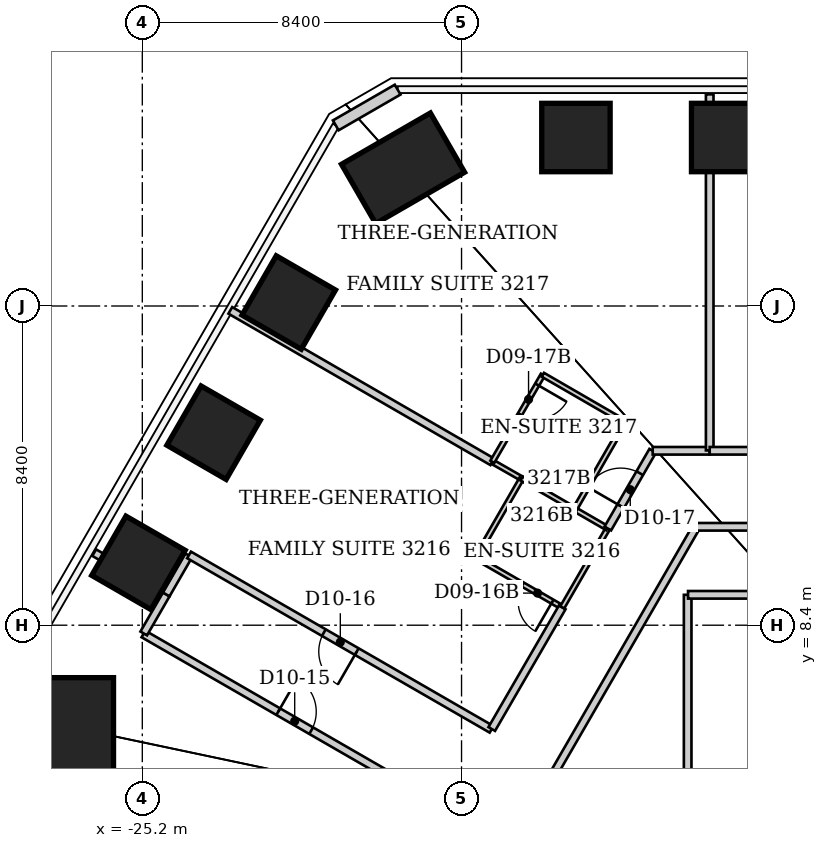
"""IFC4 building model, lengths in metres.
Left out: names, types, materials, properties, quantities, classifications, styles, units other than length and angle.
Written with IfcOpenShell. Run it as: python <this file> out.ifc"""

import sys

from ifc_helpers import new_model, si_unit, direction, frame, frame_2d, origin, origin_2d, place, context, subcontext, project, spatial, rectangle, extrude, element, fill, save


model = new_model("IFC4")
c1 = context("Model", 3, precision=1e-05, world=origin(), true_north=direction((0.0, 1.0)))
c2 = subcontext(c1, "Body", "Model", "MODEL_VIEW")
j1 = project(units=[si_unit("LENGTHUNIT", "METRE"), si_unit("PLANEANGLEUNIT", "RADIAN")], contexts=[c1])
p1 = place(None, origin())
s1 = spatial("IfcSite", under=j1, at=p1, CompositionType="ELEMENT")
p2 = place(p1, origin())
s2 = spatial("IfcBuilding", under=s1, at=p2, CompositionType="ELEMENT")
p3 = place(p2, frame((0.0, 0.0, 131.0)))
s3 = spatial("IfcBuildingStorey", under=s2, at=p3, CompositionType="ELEMENT", Elevation=131.0)
for number, where, z_axis, x_axis in (
    (1, (-13.79, 21.234, 0.0), (0.0, 0.0, 1.0), (0.0, 1.0, 0.0)),
    (2, (-9.85, 21.234, 0.0), (0.0, 0.0, 1.0), (0.0, 1.0, 0.0)),
):
    element("IfcColumn", number, at=place(p3, frame(where, z_axis=z_axis, x_axis=x_axis)), inside=s3, PredefinedType="COLUMN", context=c2, shape_type="SweptSolid", body=[
        extrude(rectangle(XDim=1.8, YDim=1.8, at=origin_2d()), origin(), (0.0, 0.0, 1.0), 3.8),
    ])
p4 = place(p3, frame((-26.857, 5.67, 0.0), z_axis=(0.0, 0.0, 1.0), x_axis=(-1.0, 0.0, 0.0)))
e3 = element("IfcColumn", 3, at=p4, inside=s3, PredefinedType="COLUMN", context=c2, shape_type="SweptSolid", body=[
    extrude(rectangle(XDim=1.8, YDim=2.7, at=origin_2d()), origin(), (0.0, 0.0, 1.0), 3.8),
])
for number, where, z_axis, x_axis in (
    (4, (-25.302, 10.041, 0.0), (0.0, 0.0, 1.0), (-0.866, 0.5, 0.0)),
    (5, (-23.324, 13.466, 0.0), (0.0, 0.0, 1.0), (-0.866, 0.5, 0.0)),
    (6, (-21.346, 16.891, 0.0), (0.0, 0.0, 1.0), (-0.866, 0.5, 0.0)),
):
    element("IfcColumn", number, at=place(p3, frame(where, z_axis=z_axis, x_axis=x_axis)), inside=s3, PredefinedType="COLUMN", context=c2, shape_type="SweptSolid", body=[
        extrude(rectangle(XDim=1.8, YDim=1.8, at=origin_2d()), origin(), (0.0, 0.0, 1.0), 3.8),
    ])
p5 = place(p3, frame((-18.339, 20.424, 0.0), z_axis=(0.0, 0.0, 1.0), x_axis=(-0.5, 0.866025403784, 0.0)))
e7 = element("IfcColumn", 7, at=p5, inside=s3, PredefinedType="COLUMN", context=c2, shape_type="SweptSolid", body=[
    extrude(rectangle(XDim=1.8, YDim=2.7, at=origin_2d()), origin(), (0.0, 0.0, 1.0), 3.8),
])
p6 = place(p3, frame((-20.11, 21.554, 0.0), z_axis=(0.0, 0.0, 1.0), x_axis=(0.865988793993, 0.500063404658, 0.0)))
e8 = element("IfcWall", 8, at=p6, inside=s3, PredefinedType="SOLIDWALL", context=c2, shape_type="SweptSolid", body=[
    extrude(rectangle(XDim=1.88, YDim=0.3, at=frame_2d((0.94, 0.0))), origin(), (0.0, 0.0, 1.0), 3.64),
])
p7 = place(p3, frame((-26.466, 10.31, 0.0), z_axis=(0.0, 0.0, 1.0), x_axis=(0.865037029405, -0.501708020425, 0.0)))
e9 = element("IfcWall", 9, at=p7, inside=s3, PredefinedType="PARTITIONING", context=c2, shape_type="SweptSolid", body=[
    extrude(rectangle(XDim=2.177, YDim=0.2, at=frame_2d((1.089, 0.0))), origin(), (0.0, 0.0, 1.0), 3.64),
])
p8 = place(p3, frame((-25.17, 8.17, 0.0), z_axis=(0.0, 0.0, 1.0), x_axis=(0.866300573619, -0.499523088702, 0.0)))
e10 = element("IfcWall", 10, at=p8, inside=s3, PredefinedType="PARTITIONING", context=c2, shape_type="SweptSolid", body=[
    extrude(rectangle(XDim=9.188, YDim=0.2, at=frame_2d((4.594, 0.0))), origin(), (0.0, 0.0, 1.0), 3.64),
])
p9 = place(p8, frame((4.094, 0.0, 0.0)))
e11 = element("IfcOpeningElement", 11, at=p9, cuts=e10, PredefinedType="OPENING", context=c2, shape_type="SweptSolid", body=[
    extrude(rectangle(XDim=1.0, YDim=2.13, at=frame_2d((0.5, 1.065))), frame((0.0, 0.1, 0.0), z_axis=(0.0, -1.0, 0.0), x_axis=(1.0, 0.0, 0.0)), (0.0, 0.0, 1.0), 0.2),
])
for number, where, z_axis, x_axis in (
    (12, (-24.57, 9.21, 0.0), (0.0, 0.0, 1.0), (-0.5, -0.866, 0.0)),
    (13, (-23.978, 10.237, 0.0), (0.0, 0.0, 1.0), (-0.5, -0.866, 0.0)),
):
    element("IfcWall", number, at=place(p3, frame(where, z_axis=z_axis, x_axis=x_axis)), inside=s3, PredefinedType="PARTITIONING", context=c2, shape_type="SweptSolid", body=[
        extrude(rectangle(XDim=1.186, YDim=0.2, at=frame_2d((0.593, 0.0))), origin(), (0.0, 0.0, 1.0), 3.64),
    ])
p10 = place(p3, frame((-22.884, 16.685, 0.0), z_axis=(0.0, 0.0, 1.0), x_axis=(0.865762644918, -0.500454835789, 0.0)))
e14 = element("IfcWall", 14, at=p10, inside=s3, PredefinedType="PARTITIONING", context=c2, shape_type="SweptSolid", body=[
    extrude(rectangle(XDim=7.963, YDim=0.2, at=frame_2d((3.981, 0.0))), origin(), (0.0, 0.0, 1.0), 3.64),
])
p11 = place(p3, frame((-16.42, 10.18, 0.0), z_axis=(0.0, 0.0, 1.0), x_axis=(0.866114241029, -0.499846097802, 0.0)))
e15 = element("IfcWall", 15, at=p11, inside=s3, PredefinedType="PARTITIONING", context=c2, shape_type="SweptSolid", body=[
    extrude(rectangle(XDim=2.621, YDim=0.12, at=frame_2d((1.311, 0.0))), origin(), (0.0, 0.0, 1.0), 3.64),
])
p12 = place(p11, frame((1.421, 0.0, 0.0)))
e16 = element("IfcOpeningElement", 16, at=p12, cuts=e15, PredefinedType="OPENING", context=c2, shape_type="SweptSolid", body=[
    extrude(rectangle(XDim=0.9, YDim=2.03, at=frame_2d((0.45, 1.015))), frame((0.0, 0.06, 0.0), z_axis=(0.0, -1.0, 0.0), x_axis=(1.0, 0.0, 0.0)), (0.0, 0.0, 1.0), 0.12),
])
p13 = place(p3, frame((-16.01, 5.66, 0.0), z_axis=(0.0, 0.0, 1.0), x_axis=(-0.866289075554, 0.499543028754, 0.0)))
e17 = element("IfcWall", 17, at=p13, inside=s3, PredefinedType="PARTITIONING", context=c2, shape_type="SweptSolid", body=[
    extrude(rectangle(XDim=9.188, YDim=0.2, at=frame_2d((4.594, 0.0))), origin(), (0.0, 0.0, 1.0), 3.64),
])
p14 = place(p13, frame((4.094, 0.0, 0.0)))
e18 = element("IfcOpeningElement", 18, at=p14, cuts=e17, PredefinedType="OPENING", context=c2, shape_type="SweptSolid", body=[
    extrude(rectangle(XDim=1.0, YDim=2.13, at=frame_2d((0.5, 1.065))), frame((0.0, 0.1, 0.0), z_axis=(0.0, -1.0, 0.0), x_axis=(1.0, 0.0, 0.0)), (0.0, 0.0, 1.0), 0.2),
])
p15 = place(p3, frame((-16.005, 5.669, 0.0), z_axis=(0.0, 0.0, 1.0), x_axis=(0.501374384923, 0.865230446842, 0.0)))
e19 = element("IfcWall", 19, at=p15, inside=s3, PredefinedType="PARTITIONING", context=c2, shape_type="SweptSolid", body=[
    extrude(rectangle(XDim=3.7, YDim=0.2, at=frame_2d((1.85, 0.0))), origin(), (0.0, 0.0, 1.0), 3.64),
])
p16 = place(p3, frame((-15.99, 12.7, 0.0), z_axis=(0.0, 0.0, 1.0), x_axis=(0.868277022428, -0.496079643125, 0.0)))
e20 = element("IfcWall", 20, at=p16, inside=s3, PredefinedType="PARTITIONING", context=c2, shape_type="SweptSolid", body=[
    extrude(rectangle(XDim=0.887, YDim=0.12, at=frame_2d((0.443, 0.0))), origin(), (0.0, 0.0, 1.0), 3.64),
])
p17 = place(p3, frame((-15.41, 2.7, 0.0), z_axis=(0.0, 0.0, 1.0), x_axis=(0.500296290322, 0.865854272894, 0.0)))
e21 = element("IfcWall", 21, at=p17, inside=s3, PredefinedType="PARTITIONING", context=c2, shape_type="SweptSolid", body=[
    extrude(rectangle(XDim=9.574, YDim=0.2, at=frame_2d((4.787, 0.0))), origin(), (0.0, 0.0, 1.0), 3.64),
])
p18 = place(p3, frame((-15.22, 12.26, 0.0), z_axis=(0.0, 0.0, 1.0), x_axis=(-0.499693115345, -0.866202511239, 0.0)))
e22 = element("IfcWall", 22, at=p18, inside=s3, PredefinedType="PARTITIONING", context=c2, shape_type="SweptSolid", body=[
    extrude(rectangle(XDim=2.401, YDim=0.12, at=frame_2d((1.201, 0.0))), origin(), (0.0, 0.0, 1.0), 3.64),
])
p19 = place(p3, frame((-15.22, 12.26, 0.0), z_axis=(0.0, 0.0, 1.0), x_axis=(0.864822777425, -0.502077248685, 0.0)))
e23 = element("IfcWall", 23, at=p19, inside=s3, PredefinedType="PARTITIONING", context=c2, shape_type="SweptSolid", body=[
    extrude(rectangle(XDim=1.617, YDim=0.12, at=frame_2d((0.809, 0.0))), origin(), (0.0, 0.0, 1.0), 3.64),
])
p20 = place(p3, frame((-14.66, 14.99, 0.0), z_axis=(0.0, 0.0, 1.0), x_axis=(-0.502242265546, -0.864726954997, 0.0)))
e24 = element("IfcWall", 24, at=p20, inside=s3, PredefinedType="PARTITIONING", context=c2, shape_type="SweptSolid", body=[
    extrude(rectangle(XDim=2.648, YDim=0.12, at=frame_2d((1.324, 0.0))), origin(), (0.0, 0.0, 1.0), 3.64),
])
p21 = place(p20, frame((0.3, 0.0, 0.0)))
e25 = element("IfcOpeningElement", 25, at=p21, cuts=e24, PredefinedType="OPENING", context=c2, shape_type="SweptSolid", body=[
    extrude(rectangle(XDim=0.9, YDim=2.03, at=frame_2d((0.45, 1.015))), frame((0.0, 0.06, 0.0), z_axis=(0.0, -1.0, 0.0), x_axis=(1.0, 0.0, 0.0)), (0.0, 0.0, 1.0), 0.12),
])
p22 = place(p3, frame((-14.15, 8.87, 0.0), z_axis=(0.0, 0.0, 1.0), x_axis=(0.500401517907, 0.865793463175, 0.0)))
e26 = element("IfcWall", 26, at=p22, inside=s3, PredefinedType="PARTITIONING", context=c2, shape_type="SweptSolid", body=[
    extrude(rectangle(XDim=2.396, YDim=0.12, at=frame_2d((1.198, 0.0))), origin(), (0.0, 0.0, 1.0), 3.64),
])
p23 = place(p3, frame((-13.821, 11.448, 0.0), z_axis=(0.0, 0.0, 1.0), x_axis=(0.865694957185, -0.500571914019, 0.0)))
e27 = element("IfcWall", 27, at=p23, inside=s3, PredefinedType="PARTITIONING", context=c2, shape_type="SweptSolid", body=[
    extrude(rectangle(XDim=0.995, YDim=0.12, at=frame_2d((0.498, 0.0))), origin(), (0.0, 0.0, 1.0), 3.64),
])
p24 = place(p3, frame((-13.82, 11.45, 0.0), z_axis=(0.0, 0.0, 1.0), x_axis=(0.499407914056, 0.866366975004, 0.0)))
e28 = element("IfcWall", 28, at=p24, inside=s3, PredefinedType="PARTITIONING", context=c2, shape_type="SweptSolid", body=[
    extrude(rectangle(XDim=2.643, YDim=0.12, at=frame_2d((1.322, 0.0))), origin(), (0.0, 0.0, 1.0), 3.64),
])
p25 = place(p3, frame((-12.951, 10.945, 0.0), z_axis=(0.0, 0.0, 1.0), x_axis=(0.499996855872, 0.86602721904, 0.0)))
e29 = element("IfcWall", 29, at=p25, inside=s3, PredefinedType="PARTITIONING", context=c2, shape_type="SweptSolid", body=[
    extrude(rectangle(XDim=2.362, YDim=0.2, at=frame_2d((1.181, 0.0))), origin(), (0.0, 0.0, 1.0), 3.64),
])
p26 = place(p25, frame((0.681, 0.0, 0.0)))
e30 = element("IfcOpeningElement", 30, at=p26, cuts=e29, PredefinedType="OPENING", context=c2, shape_type="SweptSolid", body=[
    extrude(rectangle(XDim=1.0, YDim=2.13, at=frame_2d((0.5, 1.065))), frame((0.0, 0.1, 0.0), z_axis=(0.0, -1.0, 0.0), x_axis=(1.0, 0.0, 0.0)), (0.0, 0.0, 1.0), 0.2),
])
p27 = place(p3, frame((-12.5, 13.74, 0.0), z_axis=(0.0, 0.0, 1.0), x_axis=(-0.865508881864, 0.500893576935, 0.0)))
e31 = element("IfcWall", 31, at=p27, inside=s3, PredefinedType="PARTITIONING", context=c2, shape_type="SweptSolid", body=[
    extrude(rectangle(XDim=2.496, YDim=0.12, at=frame_2d((1.248, 0.0))), origin(), (0.0, 0.0, 1.0), 3.64),
])
p28 = place(p3, frame((-10.85, 9.2, 0.0), z_axis=(0.0, 0.0, 1.0), x_axis=(0.0, -1.0, 0.0)))
e32 = element("IfcWall", 32, at=p28, inside=s3, PredefinedType="PARTITIONING", context=c2, shape_type="SweptSolid", body=[
    extrude(rectangle(XDim=14.39, YDim=0.2, at=frame_2d((7.195, 0.0))), origin(), (0.0, 0.0, 1.0), 3.64),
])
p29 = place(p28, frame((6.645, 0.0, 0.0)))
e33 = element("IfcOpeningElement", 33, at=p29, cuts=e32, PredefinedType="OPENING", context=c2, shape_type="SweptSolid", body=[
    extrude(rectangle(XDim=1.1, YDim=2.2, at=frame_2d((0.55, 1.1))), frame((0.0, 0.1, 0.0), z_axis=(0.0, -1.0, 0.0), x_axis=(1.0, 0.0, 0.0)), (0.0, 0.0, 1.0), 0.2),
])
p30 = place(p3, frame((-10.62, 10.99, 0.0), z_axis=(0.0, 0.0, 1.0), x_axis=(1.0, 0.0, 0.0)))
e34 = element("IfcWall", 34, at=p30, inside=s3, PredefinedType="PARTITIONING", context=c2, shape_type="SweptSolid", body=[
    extrude(rectangle(XDim=10.47, YDim=0.2, at=frame_2d((5.235, 0.0))), origin(), (0.0, 0.0, 1.0), 3.64),
])
p31 = place(p3, frame((-10.27, 12.99, 0.0), z_axis=(0.0, 0.0, 1.0), x_axis=(-1.0, 0.0, 0.0)))
e35 = element("IfcWall", 35, at=p31, inside=s3, PredefinedType="PARTITIONING", context=c2, shape_type="SweptSolid", body=[
    extrude(rectangle(XDim=1.5, YDim=0.2, at=frame_2d((0.75, 0.0))), origin(), (0.0, 0.0, 1.0), 3.64),
])
p32 = place(p3, frame((-10.27, 13.0, 0.0), z_axis=(0.0, 0.0, 1.0), x_axis=(0.0, 1.0, 0.0)))
e36 = element("IfcWall", 36, at=p32, inside=s3, PredefinedType="PARTITIONING", context=c2, shape_type="SweptSolid", body=[
    extrude(rectangle(XDim=9.37, YDim=0.2, at=frame_2d((4.685, 0.0))), origin(), (0.0, 0.0, 1.0), 3.64),
])
p33 = place(p3, frame((-0.15, 9.2, 0.0), z_axis=(0.0, 0.0, 1.0), x_axis=(-1.0, 0.0, 0.0)))
e37 = element("IfcWall", 37, at=p33, inside=s3, PredefinedType="PARTITIONING", context=c2, shape_type="SweptSolid", body=[
    extrude(rectangle(XDim=10.69, YDim=0.2, at=frame_2d((5.345, 0.0))), origin(), (0.0, 0.0, 1.0), 3.64),
])
p34 = place(p3, frame((0.85, 12.99, 0.0), z_axis=(0.0, 0.0, 1.0), x_axis=(-1.0, 0.0, 0.0)))
e38 = element("IfcWall", 38, at=p34, inside=s3, PredefinedType="PARTITIONING", context=c2, shape_type="SweptSolid", body=[
    extrude(rectangle(XDim=11.12, YDim=0.2, at=frame_2d((5.56, 0.0))), origin(), (0.0, 0.0, 1.0), 3.64),
])
p35 = place(p34, frame((5.01, 0.0, 0.0)))
e39 = element("IfcOpeningElement", 39, at=p35, cuts=e38, PredefinedType="OPENING", context=c2, shape_type="SweptSolid", body=[
    extrude(rectangle(XDim=1.1, YDim=2.2, at=frame_2d((0.55, 1.1))), frame((0.0, 0.1, 0.0), z_axis=(0.0, -1.0, 0.0), x_axis=(1.0, 0.0, 0.0)), (0.0, 0.0, 1.0), 0.2),
])
p36 = place(p9, origin())
e40 = element("IfcDoor", 40, at=p36, inside=s3, OperationType="SINGLE_SWING_LEFT", PredefinedType="DOOR", context=c2, shape_type="SweptSolid", body=[
    extrude(rectangle(XDim=1.0, YDim=2.13, at=frame_2d((0.5, 1.065))), frame((0.0, 0.025, 0.0), z_axis=(0.0, -1.0, 0.0), x_axis=(1.0, 0.0, 0.0)), (0.0, 0.0, 1.0), 0.05),
])
fill(e11, e40)
p37 = place(p14, origin())
e41 = element("IfcDoor", 41, at=p37, inside=s3, OperationType="SINGLE_SWING_LEFT", PredefinedType="DOOR", context=c2, shape_type="SweptSolid", body=[
    extrude(rectangle(XDim=1.0, YDim=2.13, at=frame_2d((0.5, 1.065))), frame((0.0, 0.025, 0.0), z_axis=(0.0, -1.0, 0.0), x_axis=(1.0, 0.0, 0.0)), (0.0, 0.0, 1.0), 0.05),
])
fill(e18, e41)
p38 = place(p12, origin())
e42 = element("IfcDoor", 42, at=p38, inside=s3, OperationType="SINGLE_SWING_RIGHT", PredefinedType="DOOR", context=c2, shape_type="SweptSolid", body=[
    extrude(rectangle(XDim=0.9, YDim=2.03, at=frame_2d((0.45, 1.015))), frame((0.0, 0.025, 0.0), z_axis=(0.0, -1.0, 0.0), x_axis=(1.0, 0.0, 0.0)), (0.0, 0.0, 1.0), 0.05),
])
fill(e16, e42)
p39 = place(p26, origin())
e43 = element("IfcDoor", 43, at=p39, inside=s3, OperationType="SINGLE_SWING_LEFT", PredefinedType="DOOR", context=c2, shape_type="SweptSolid", body=[
    extrude(rectangle(XDim=1.0, YDim=2.13, at=frame_2d((0.5, 1.065))), frame((0.0, 0.025, 0.0), z_axis=(0.0, -1.0, 0.0), x_axis=(1.0, 0.0, 0.0)), (0.0, 0.0, 1.0), 0.05),
])
fill(e30, e43)
p40 = place(p21, origin())
e44 = element("IfcDoor", 44, at=p40, inside=s3, OperationType="SINGLE_SWING_LEFT", PredefinedType="DOOR", context=c2, shape_type="SweptSolid", body=[
    extrude(rectangle(XDim=0.9, YDim=2.03, at=frame_2d((0.45, 1.015))), frame((0.0, 0.025, 0.0), z_axis=(0.0, -1.0, 0.0), x_axis=(1.0, 0.0, 0.0)), (0.0, 0.0, 1.0), 0.05),
])
fill(e25, e44)
save(model, sys.argv[1])
